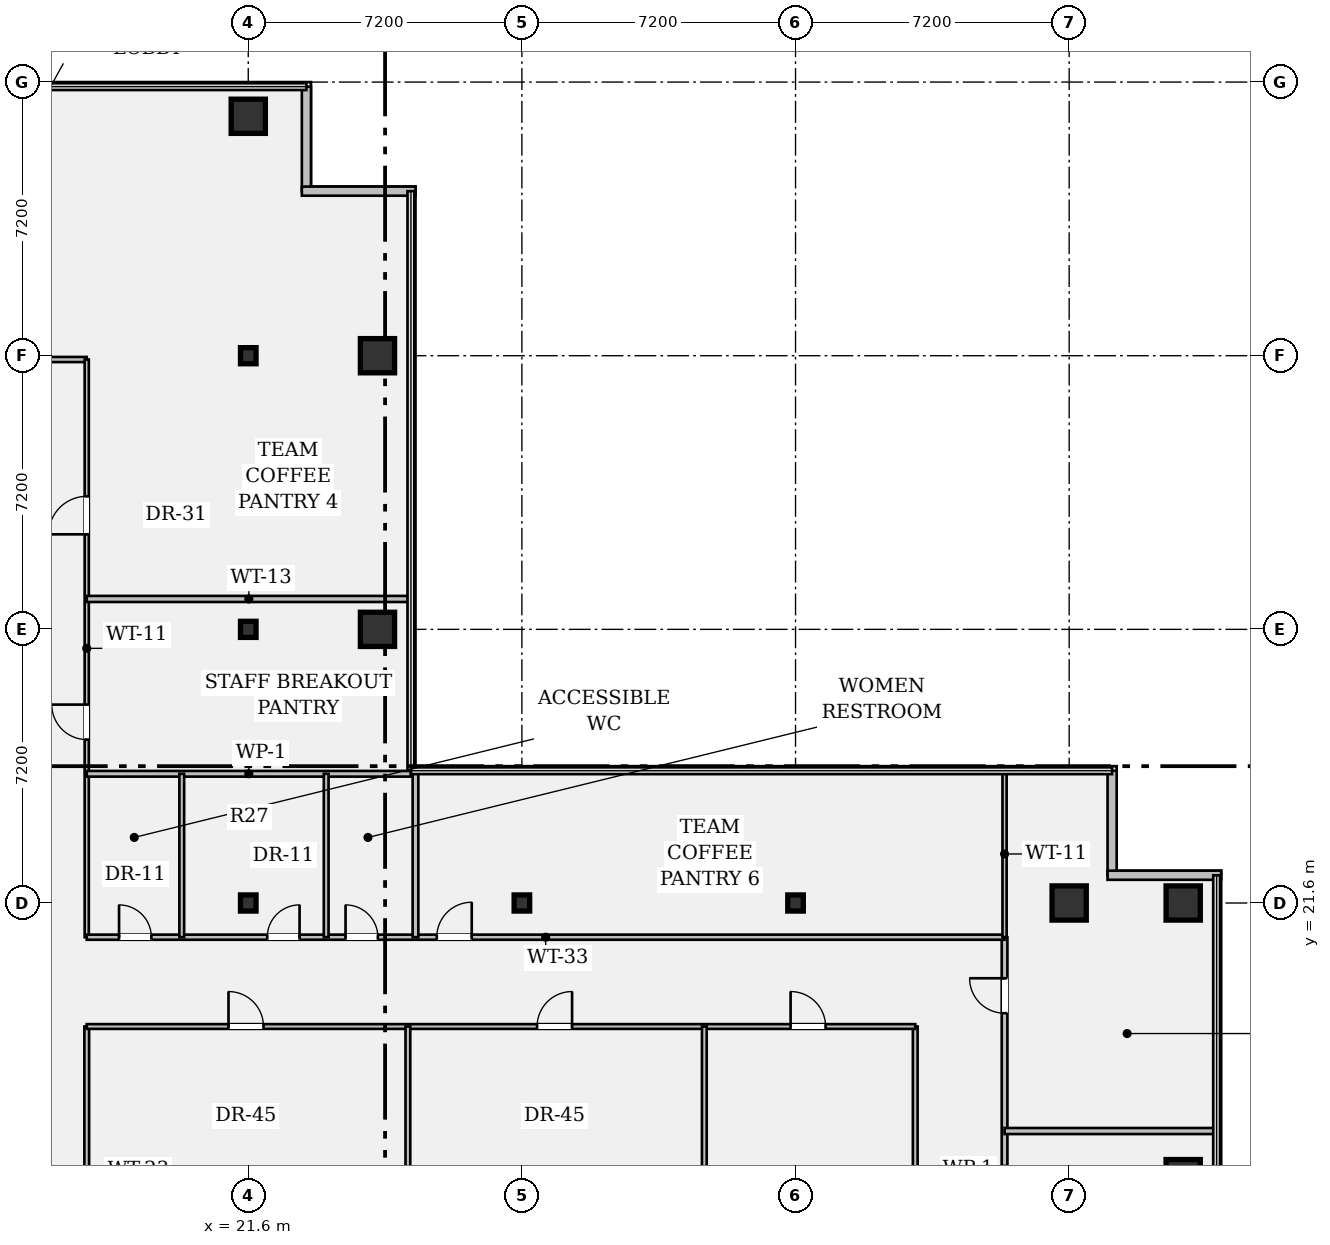
"""IFC4 building model, lengths in metres.
Left out: names, types, materials, properties, quantities, classifications, styles, units other than length and angle.
Written with IfcOpenShell. Run it as: python <this file> out.ifc"""

import sys

from ifc_helpers import new_model, si_unit, direction, frame, frame_2d, origin, origin_2d, place, context, subcontext, project, spatial, rectangle, hollow_rectangle, i_section, extrude, element, fill, save


model = new_model("IFC4")
c1 = context("Model", 3, precision=1e-05, world=origin(), true_north=direction((0.0, 1.0)))
c2 = subcontext(c1, "Body", "Model", "MODEL_VIEW")
j1 = project(units=[si_unit("LENGTHUNIT", "METRE"), si_unit("PLANEANGLEUNIT", "RADIAN")], contexts=[c1])
p1 = place(None, origin())
s1 = spatial("IfcSite", under=j1, at=p1, CompositionType="ELEMENT")
p2 = place(p1, origin())
s2 = spatial("IfcBuilding", under=s1, at=p2, CompositionType="ELEMENT")
p3 = place(p2, frame((0.0, 0.0, 125.3)))
s3 = spatial("IfcBuildingStorey", under=s2, at=p3, CompositionType="ELEMENT", Elevation=125.3)
for number, where, z_axis, x_axis in (
    (1, (21.6, 21.6, 0.0), (0.0, 0.0, 1.0), (1.0, 0.0, 0.0)),
    (2, (21.6, 28.8, 0.0), (0.0, 0.0, 1.0), (1.0, 0.0, 0.0)),
    (3, (21.6, 36.0, 0.0), (0.0, 0.0, 1.0), (1.0, 0.0, 0.0)),
):
    element("IfcColumn", number, at=place(p3, frame(where, z_axis=z_axis, x_axis=x_axis)), inside=s3, PredefinedType="COLUMN", context=c2, shape_type="SweptSolid", body=[
        extrude(i_section(OverallWidth=0.409, OverallDepth=0.424, WebThickness=0.033, FlangeThickness=0.052, FilletRadius=0.018, at=origin_2d()), origin(), (0.0, 0.0, 1.0), 3.58),
    ])
for number, where, z_axis, x_axis in (
    (4, (21.6, 42.3, 0.0), (0.0, 0.0, 1.0), (1.0, 0.0, 0.0)),
    (5, (25.0, 28.8, 0.0), (0.0, 0.0, 1.0), (1.0, 0.0, 0.0)),
    (6, (25.0, 36.0, 0.0), (0.0, 0.0, 1.0), (1.0, 0.0, 0.0)),
):
    element("IfcColumn", number, at=place(p3, frame(where, z_axis=z_axis, x_axis=x_axis)), inside=s3, PredefinedType="COLUMN", context=c2, shape_type="SweptSolid", body=[
        extrude(hollow_rectangle(XDim=0.9, YDim=0.9, WallThickness=0.055, at=origin_2d()), origin(), (0.0, 0.0, 1.0), 3.58),
    ])
for number, where, z_axis, x_axis in (
    (7, (28.8, 21.6, 0.0), (0.0, 0.0, 1.0), (1.0, 0.0, 0.0)),
    (8, (36.0, 21.6, 0.0), (0.0, 0.0, 1.0), (1.0, 0.0, 0.0)),
):
    element("IfcColumn", number, at=place(p3, frame(where, z_axis=z_axis, x_axis=x_axis)), inside=s3, PredefinedType="COLUMN", context=c2, shape_type="SweptSolid", body=[
        extrude(i_section(OverallWidth=0.409, OverallDepth=0.424, WebThickness=0.033, FlangeThickness=0.052, FilletRadius=0.018, at=origin_2d()), origin(), (0.0, 0.0, 1.0), 3.58),
    ])
for number, where, z_axis, x_axis in (
    (9, (43.2, 21.6, 0.0), (0.0, 0.0, 1.0), (1.0, 0.0, 0.0)),
    (10, (46.2, 14.4, 0.0), (0.0, 0.0, 1.0), (1.0, 0.0, 0.0)),
    (11, (46.2, 21.6, 0.0), (0.0, 0.0, 1.0), (1.0, 0.0, 0.0)),
):
    element("IfcColumn", number, at=place(p3, frame(where, z_axis=z_axis, x_axis=x_axis)), inside=s3, PredefinedType="COLUMN", context=c2, shape_type="SweptSolid", body=[
        extrude(hollow_rectangle(XDim=0.9, YDim=0.9, WallThickness=0.055, at=origin_2d()), origin(), (0.0, 0.0, 1.0), 3.58),
    ])
p4 = place(p3, frame((23.13, 43.08, 0.0), z_axis=(0.0, 0.0, 1.0), x_axis=(0.0, -1.0, 0.0)))
e12 = element("IfcWall", 12, at=p4, inside=s3, PredefinedType="STANDARD", context=c2, shape_type="SweptSolid", body=[
    extrude(rectangle(XDim=2.75, YDim=0.24, at=frame_2d((1.375, 0.0))), origin(), (0.0, 0.0, 1.0), 3.58),
])
p5 = place(p3, frame((23.01, 40.33, 0.0), z_axis=(0.0, 0.0, 1.0), x_axis=(1.0, 0.0, 0.0)))
e13 = element("IfcWall", 13, at=p5, inside=s3, PredefinedType="STANDARD", context=c2, shape_type="SweptSolid", body=[
    extrude(rectangle(XDim=2.99, YDim=0.24, at=frame_2d((1.495, 0.0))), origin(), (0.0, 0.0, 1.0), 3.58),
])
p6 = place(p3, frame((44.33, 25.08, 0.0), z_axis=(0.0, 0.0, 1.0), x_axis=(0.0, -1.0, 0.0)))
e14 = element("IfcWall", 14, at=p6, inside=s3, PredefinedType="STANDARD", context=c2, shape_type="SweptSolid", body=[
    extrude(rectangle(XDim=2.75, YDim=0.24, at=frame_2d((1.375, 0.0))), origin(), (0.0, 0.0, 1.0), 3.58),
])
p7 = place(p3, frame((44.21, 22.33, 0.0), z_axis=(0.0, 0.0, 1.0), x_axis=(1.0, 0.0, 0.0)))
e15 = element("IfcWall", 15, at=p7, inside=s3, PredefinedType="STANDARD", context=c2, shape_type="SweptSolid", body=[
    extrude(rectangle(XDim=2.99, YDim=0.24, at=frame_2d((1.495, 0.0))), origin(), (0.0, 0.0, 1.0), 3.58),
])
p8 = place(p3, frame((14.4, 35.9, 0.0), z_axis=(0.0, 0.0, 1.0), x_axis=(1.0, 0.0, 0.0)))
e16 = element("IfcWall", 16, at=p8, inside=s3, PredefinedType="PARTITIONING", context=c2, shape_type="SweptSolid", body=[
    extrude(rectangle(XDim=2.95, YDim=0.135, at=frame_2d((1.475, 0.0))), origin(), (0.0, 0.0, 1.0), 2.869),
])
p9 = place(p8, frame((0.95, 0.0, 0.0)))
e17 = element("IfcOpeningElement", 17, at=p9, cuts=e16, PredefinedType="OPENING", context=c2, shape_type="SweptSolid", body=[
    extrude(rectangle(XDim=1.0, YDim=2.15, at=frame_2d((0.5, 1.075))), frame((0.0, 0.08, 0.0), z_axis=(0.0, -1.0, 0.0), x_axis=(1.0, 0.0, 0.0)), (0.0, 0.0, 1.0), 0.159),
])
p10 = place(p3, frame((17.35, 20.7, 0.0), z_axis=(0.0, 0.0, 1.0), x_axis=(0.0, 1.0, 0.0)))
e18 = element("IfcWall", 18, at=p10, inside=s3, PredefinedType="PARTITIONING", context=c2, shape_type="SweptSolid", body=[
    extrude(rectangle(XDim=15.2, YDim=0.11, at=frame_2d((7.6, 0.0))), origin(), (0.0, 0.0, 1.0), 2.869),
])
p11 = place(p10, frame((5.2, 0.0, 0.0)))
e19 = element("IfcOpeningElement", 19, at=p11, cuts=e18, PredefinedType="OPENING", context=c2, shape_type="SweptSolid", body=[
    extrude(rectangle(XDim=0.92, YDim=2.15, at=frame_2d((0.46, 1.075))), frame((0.0, 0.067, 0.0), z_axis=(0.0, -1.0, 0.0), x_axis=(1.0, 0.0, 0.0)), (0.0, 0.0, 1.0), 0.134),
])
p12 = place(p10, frame((10.6, 0.0, 0.0)))
e20 = element("IfcOpeningElement", 20, at=p12, cuts=e18, PredefinedType="OPENING", context=c2, shape_type="SweptSolid", body=[
    extrude(rectangle(XDim=1.0, YDim=2.15, at=frame_2d((0.5, 1.075))), frame((0.0, 0.067, 0.0), z_axis=(0.0, -1.0, 0.0), x_axis=(1.0, 0.0, 0.0)), (0.0, 0.0, 1.0), 0.134),
])
p13 = place(p3, frame((41.5, 8.5, 0.0), z_axis=(0.0, 0.0, 1.0), x_axis=(0.0, 1.0, 0.0)))
e21 = element("IfcWall", 21, at=p13, inside=s3, PredefinedType="PARTITIONING", context=c2, shape_type="SweptSolid", body=[
    extrude(rectangle(XDim=12.2, YDim=0.15, at=frame_2d((6.1, 0.0))), origin(), (0.0, 0.0, 1.0), 2.869),
])
p14 = place(p13, frame((1.2, 0.0, 0.0)))
e22 = element("IfcOpeningElement", 22, at=p14, cuts=e21, PredefinedType="OPENING", context=c2, shape_type="SweptSolid", body=[
    extrude(rectangle(XDim=0.92, YDim=2.15, at=frame_2d((0.46, 1.075))), frame((0.0, 0.087, 0.0), z_axis=(0.0, -1.0, 0.0), x_axis=(1.0, 0.0, 0.0)), (0.0, 0.0, 1.0), 0.174),
])
p15 = place(p13, frame((10.2, 0.0, 0.0)))
e23 = element("IfcOpeningElement", 23, at=p15, cuts=e21, PredefinedType="OPENING", context=c2, shape_type="SweptSolid", body=[
    extrude(rectangle(XDim=0.92, YDim=2.15, at=frame_2d((0.46, 1.075))), frame((0.0, 0.087, 0.0), z_axis=(0.0, -1.0, 0.0), x_axis=(1.0, 0.0, 0.0)), (0.0, 0.0, 1.0), 0.174),
])
p16 = place(p3, frame((17.35, 20.7, 0.0), z_axis=(0.0, 0.0, 1.0), x_axis=(1.0, 0.0, 0.0)))
e24 = element("IfcWall", 24, at=p16, inside=s3, PredefinedType="PARTITIONING", context=c2, shape_type="SweptSolid", body=[
    extrude(rectangle(XDim=24.15, YDim=0.135, at=frame_2d((12.075, 0.0))), origin(), (0.0, 0.0, 1.0), 2.869),
])
p17 = place(p16, frame((0.85, 0.0, 0.0)))
e25 = element("IfcOpeningElement", 25, at=p17, cuts=e24, PredefinedType="OPENING", context=c2, shape_type="SweptSolid", body=[
    extrude(rectangle(XDim=0.85, YDim=2.15, at=frame_2d((0.425, 1.075))), frame((0.0, 0.08, 0.0), z_axis=(0.0, -1.0, 0.0), x_axis=(1.0, 0.0, 0.0)), (0.0, 0.0, 1.0), 0.159),
])
p18 = place(p16, frame((4.75, 0.0, 0.0)))
e26 = element("IfcOpeningElement", 26, at=p18, cuts=e24, PredefinedType="OPENING", context=c2, shape_type="SweptSolid", body=[
    extrude(rectangle(XDim=0.85, YDim=2.15, at=frame_2d((0.425, 1.075))), frame((0.0, 0.08, 0.0), z_axis=(0.0, -1.0, 0.0), x_axis=(1.0, 0.0, 0.0)), (0.0, 0.0, 1.0), 0.159),
])
p19 = place(p16, frame((6.81, 0.0, 0.0)))
e27 = element("IfcOpeningElement", 27, at=p19, cuts=e24, PredefinedType="OPENING", context=c2, shape_type="SweptSolid", body=[
    extrude(rectangle(XDim=0.85, YDim=2.15, at=frame_2d((0.425, 1.075))), frame((0.0, 0.08, 0.0), z_axis=(0.0, -1.0, 0.0), x_axis=(1.0, 0.0, 0.0)), (0.0, 0.0, 1.0), 0.159),
])
p20 = place(p16, frame((9.21, 0.0, 0.0)))
e28 = element("IfcOpeningElement", 28, at=p20, cuts=e24, PredefinedType="OPENING", context=c2, shape_type="SweptSolid", body=[
    extrude(rectangle(XDim=0.92, YDim=2.15, at=frame_2d((0.46, 1.075))), frame((0.0, 0.08, 0.0), z_axis=(0.0, -1.0, 0.0), x_axis=(1.0, 0.0, 0.0)), (0.0, 0.0, 1.0), 0.159),
])
for number, where, z_axis, x_axis in (
    (29, (17.35, 10.8, 0.0), (0.0, 0.0, 1.0), (0.0, 1.0, 0.0)),
    (30, (39.15, 10.8, 0.0), (0.0, 0.0, 1.0), (0.0, 1.0, 0.0)),
):
    element("IfcWall", number, at=place(p3, frame(where, z_axis=z_axis, x_axis=x_axis)), inside=s3, PredefinedType="PARTITIONING", context=c2, shape_type="SweptSolid", body=[
        extrude(rectangle(XDim=7.55, YDim=0.125, at=frame_2d((3.775, 0.0))), origin(), (0.0, 0.0, 1.0), 2.869),
    ])
p21 = place(p3, frame((17.35, 18.35, 0.0), z_axis=(0.0, 0.0, 1.0), x_axis=(1.0, 0.0, 0.0)))
e31 = element("IfcWall", 31, at=p21, inside=s3, PredefinedType="PARTITIONING", context=c2, shape_type="SweptSolid", body=[
    extrude(rectangle(XDim=21.8, YDim=0.125, at=frame_2d((10.9, 0.0))), origin(), (0.0, 0.0, 1.0), 2.869),
])
p22 = place(p21, frame((3.73, 0.0, 0.0)))
e32 = element("IfcOpeningElement", 32, at=p22, cuts=e31, PredefinedType="OPENING", context=c2, shape_type="SweptSolid", body=[
    extrude(rectangle(XDim=0.92, YDim=2.15, at=frame_2d((0.46, 1.075))), frame((0.0, 0.074, 0.0), z_axis=(0.0, -1.0, 0.0), x_axis=(1.0, 0.0, 0.0)), (0.0, 0.0, 1.0), 0.149),
])
p23 = place(p21, frame((11.85, 0.0, 0.0)))
e33 = element("IfcOpeningElement", 33, at=p23, cuts=e31, PredefinedType="OPENING", context=c2, shape_type="SweptSolid", body=[
    extrude(rectangle(XDim=0.92, YDim=2.15, at=frame_2d((0.46, 1.075))), frame((0.0, 0.074, 0.0), z_axis=(0.0, -1.0, 0.0), x_axis=(1.0, 0.0, 0.0)), (0.0, 0.0, 1.0), 0.149),
])
p24 = place(p21, frame((18.52, 0.0, 0.0)))
e34 = element("IfcOpeningElement", 34, at=p24, cuts=e31, PredefinedType="OPENING", context=c2, shape_type="SweptSolid", body=[
    extrude(rectangle(XDim=0.92, YDim=2.15, at=frame_2d((0.46, 1.075))), frame((0.0, 0.074, 0.0), z_axis=(0.0, -1.0, 0.0), x_axis=(1.0, 0.0, 0.0)), (0.0, 0.0, 1.0), 0.149),
])
for number, where, z_axis, x_axis in (
    (35, (25.8, 10.8, 0.0), (0.0, 0.0, 1.0), (0.0, 1.0, 0.0)),
    (36, (33.6, 10.8, 0.0), (0.0, 0.0, 1.0), (0.0, 1.0, 0.0)),
):
    element("IfcWall", number, at=place(p3, frame(where, z_axis=z_axis, x_axis=x_axis)), inside=s3, PredefinedType="PARTITIONING", context=c2, shape_type="SweptSolid", body=[
        extrude(rectangle(XDim=7.55, YDim=0.125, at=frame_2d((3.775, 0.0))), origin(), (0.0, 0.0, 1.0), 2.869),
    ])
p25 = place(p3, frame((17.35, 25.0, 0.0), z_axis=(0.0, 0.0, 1.0), x_axis=(1.0, 0.0, 0.0)))
e37 = element("IfcWall", 37, at=p25, inside=s3, PredefinedType="PARTITIONING", context=c2, shape_type="SweptSolid", body=[
    extrude(rectangle(XDim=8.53, YDim=0.15, at=frame_2d((4.265, 0.0))), origin(), (0.0, 0.0, 1.0), 2.869),
])
for number, where, z_axis, x_axis in (
    (38, (19.85, 20.7, 0.0), (0.0, 0.0, 1.0), (0.0, 1.0, 0.0)),
    (39, (23.65, 20.7, 0.0), (0.0, 0.0, 1.0), (0.0, 1.0, 0.0)),
):
    element("IfcWall", number, at=place(p3, frame(where, z_axis=z_axis, x_axis=x_axis)), inside=s3, PredefinedType="PARTITIONING", context=c2, shape_type="SweptSolid", body=[
        extrude(rectangle(XDim=4.3, YDim=0.125, at=frame_2d((2.15, 0.0))), origin(), (0.0, 0.0, 1.0), 2.869),
    ])
p26 = place(p3, frame((17.35, 29.6, 0.0), z_axis=(0.0, 0.0, 1.0), x_axis=(1.0, 0.0, 0.0)))
e40 = element("IfcWall", 40, at=p26, inside=s3, PredefinedType="PARTITIONING", context=c2, shape_type="SweptSolid", body=[
    extrude(rectangle(XDim=8.53, YDim=0.16, at=frame_2d((4.265, 0.0))), origin(), (0.0, 0.0, 1.0), 2.869),
])
p27 = place(p3, frame((26.0, 20.7, 0.0), z_axis=(0.0, 0.0, 1.0), x_axis=(0.0, 1.0, 0.0)))
e41 = element("IfcWall", 41, at=p27, inside=s3, PredefinedType="PARTITIONING", context=c2, shape_type="SweptSolid", body=[
    extrude(rectangle(XDim=4.38, YDim=0.15, at=frame_2d((2.19, 0.0))), origin(), (0.0, 0.0, 1.0), 2.869),
])
p28 = place(p3, frame((41.5, 20.7, 0.0), z_axis=(0.0, 0.0, 1.0), x_axis=(0.0, 1.0, 0.0)))
e42 = element("IfcWall", 42, at=p28, inside=s3, PredefinedType="PARTITIONING", context=c2, shape_type="SweptSolid", body=[
    extrude(rectangle(XDim=4.38, YDim=0.11, at=frame_2d((2.19, 0.0))), origin(), (0.0, 0.0, 1.0), 2.869),
])
p29 = place(p3, frame((41.5, 15.6, 0.0), z_axis=(0.0, 0.0, 1.0), x_axis=(1.0, 0.0, 0.0)))
e43 = element("IfcWall", 43, at=p29, inside=s3, PredefinedType="PARTITIONING", context=c2, shape_type="SweptSolid", body=[
    extrude(rectangle(XDim=5.58, YDim=0.16, at=frame_2d((2.79, 0.0))), origin(), (0.0, 0.0, 1.0), 2.869),
])
p30 = place(p22, origin())
e44 = element("IfcDoor", 44, at=p30, inside=s3, OperationType="SINGLE_SWING_LEFT", PredefinedType="DOOR", context=c2, shape_type="SweptSolid", body=[
    extrude(rectangle(XDim=0.92, YDim=2.15, at=frame_2d((0.46, 1.075))), frame((0.0, 0.025, 0.0), z_axis=(0.0, -1.0, 0.0), x_axis=(1.0, 0.0, 0.0)), (0.0, 0.0, 1.0), 0.05),
])
fill(e32, e44)
p31 = place(p23, origin())
e45 = element("IfcDoor", 45, at=p31, inside=s3, OperationType="SINGLE_SWING_RIGHT", PredefinedType="DOOR", context=c2, shape_type="SweptSolid", body=[
    extrude(rectangle(XDim=0.92, YDim=2.15, at=frame_2d((0.46, 1.075))), frame((0.0, 0.025, 0.0), z_axis=(0.0, -1.0, 0.0), x_axis=(1.0, 0.0, 0.0)), (0.0, 0.0, 1.0), 0.05),
])
fill(e33, e45)
p32 = place(p24, origin())
e46 = element("IfcDoor", 46, at=p32, inside=s3, OperationType="SINGLE_SWING_LEFT", PredefinedType="DOOR", context=c2, shape_type="SweptSolid", body=[
    extrude(rectangle(XDim=0.92, YDim=2.15, at=frame_2d((0.46, 1.075))), frame((0.0, 0.025, 0.0), z_axis=(0.0, -1.0, 0.0), x_axis=(1.0, 0.0, 0.0)), (0.0, 0.0, 1.0), 0.05),
])
fill(e34, e46)
p33 = place(p17, origin())
e47 = element("IfcDoor", 47, at=p33, inside=s3, OperationType="SINGLE_SWING_LEFT", PredefinedType="DOOR", context=c2, shape_type="SweptSolid", body=[
    extrude(rectangle(XDim=0.85, YDim=2.15, at=frame_2d((0.425, 1.075))), frame((0.0, 0.025, 0.0), z_axis=(0.0, -1.0, 0.0), x_axis=(1.0, 0.0, 0.0)), (0.0, 0.0, 1.0), 0.05),
])
fill(e25, e47)
p34 = place(p18, origin())
e48 = element("IfcDoor", 48, at=p34, inside=s3, OperationType="SINGLE_SWING_RIGHT", PredefinedType="DOOR", context=c2, shape_type="SweptSolid", body=[
    extrude(rectangle(XDim=0.85, YDim=2.15, at=frame_2d((0.425, 1.075))), frame((0.0, 0.025, 0.0), z_axis=(0.0, -1.0, 0.0), x_axis=(1.0, 0.0, 0.0)), (0.0, 0.0, 1.0), 0.05),
])
fill(e26, e48)
p35 = place(p19, origin())
e49 = element("IfcDoor", 49, at=p35, inside=s3, OperationType="SINGLE_SWING_LEFT", PredefinedType="DOOR", context=c2, shape_type="SweptSolid", body=[
    extrude(rectangle(XDim=0.85, YDim=2.15, at=frame_2d((0.425, 1.075))), frame((0.0, 0.025, 0.0), z_axis=(0.0, -1.0, 0.0), x_axis=(1.0, 0.0, 0.0)), (0.0, 0.0, 1.0), 0.05),
])
fill(e27, e49)
p36 = place(p11, origin())
e50 = element("IfcDoor", 50, at=p36, inside=s3, OperationType="SINGLE_SWING_RIGHT", PredefinedType="DOOR", context=c2, shape_type="SweptSolid", body=[
    extrude(rectangle(XDim=0.92, YDim=2.15, at=frame_2d((0.46, 1.075))), frame((0.0, 0.025, 0.0), z_axis=(0.0, -1.0, 0.0), x_axis=(1.0, 0.0, 0.0)), (0.0, 0.0, 1.0), 0.05),
])
fill(e19, e50)
p37 = place(p12, origin())
e51 = element("IfcDoor", 51, at=p37, inside=s3, OperationType="SINGLE_SWING_LEFT", PredefinedType="DOOR", context=c2, shape_type="SweptSolid", body=[
    extrude(rectangle(XDim=1.0, YDim=2.15, at=frame_2d((0.5, 1.075))), frame((0.0, 0.025, 0.0), z_axis=(0.0, -1.0, 0.0), x_axis=(1.0, 0.0, 0.0)), (0.0, 0.0, 1.0), 0.05),
])
fill(e20, e51)
p38 = place(p20, origin())
e52 = element("IfcDoor", 52, at=p38, inside=s3, OperationType="SINGLE_SWING_RIGHT", PredefinedType="DOOR", context=c2, shape_type="SweptSolid", body=[
    extrude(rectangle(XDim=0.92, YDim=2.15, at=frame_2d((0.46, 1.075))), frame((0.0, 0.025, 0.0), z_axis=(0.0, -1.0, 0.0), x_axis=(1.0, 0.0, 0.0)), (0.0, 0.0, 1.0), 0.05),
])
fill(e28, e52)
p39 = place(p15, origin())
e53 = element("IfcDoor", 53, at=p39, inside=s3, OperationType="SINGLE_SWING_RIGHT", PredefinedType="DOOR", context=c2, shape_type="SweptSolid", body=[
    extrude(rectangle(XDim=0.92, YDim=2.15, at=frame_2d((0.46, 1.075))), frame((0.0, 0.025, 0.0), z_axis=(0.0, -1.0, 0.0), x_axis=(1.0, 0.0, 0.0)), (0.0, 0.0, 1.0), 0.05),
])
fill(e23, e53)
save(model, sys.argv[1])
